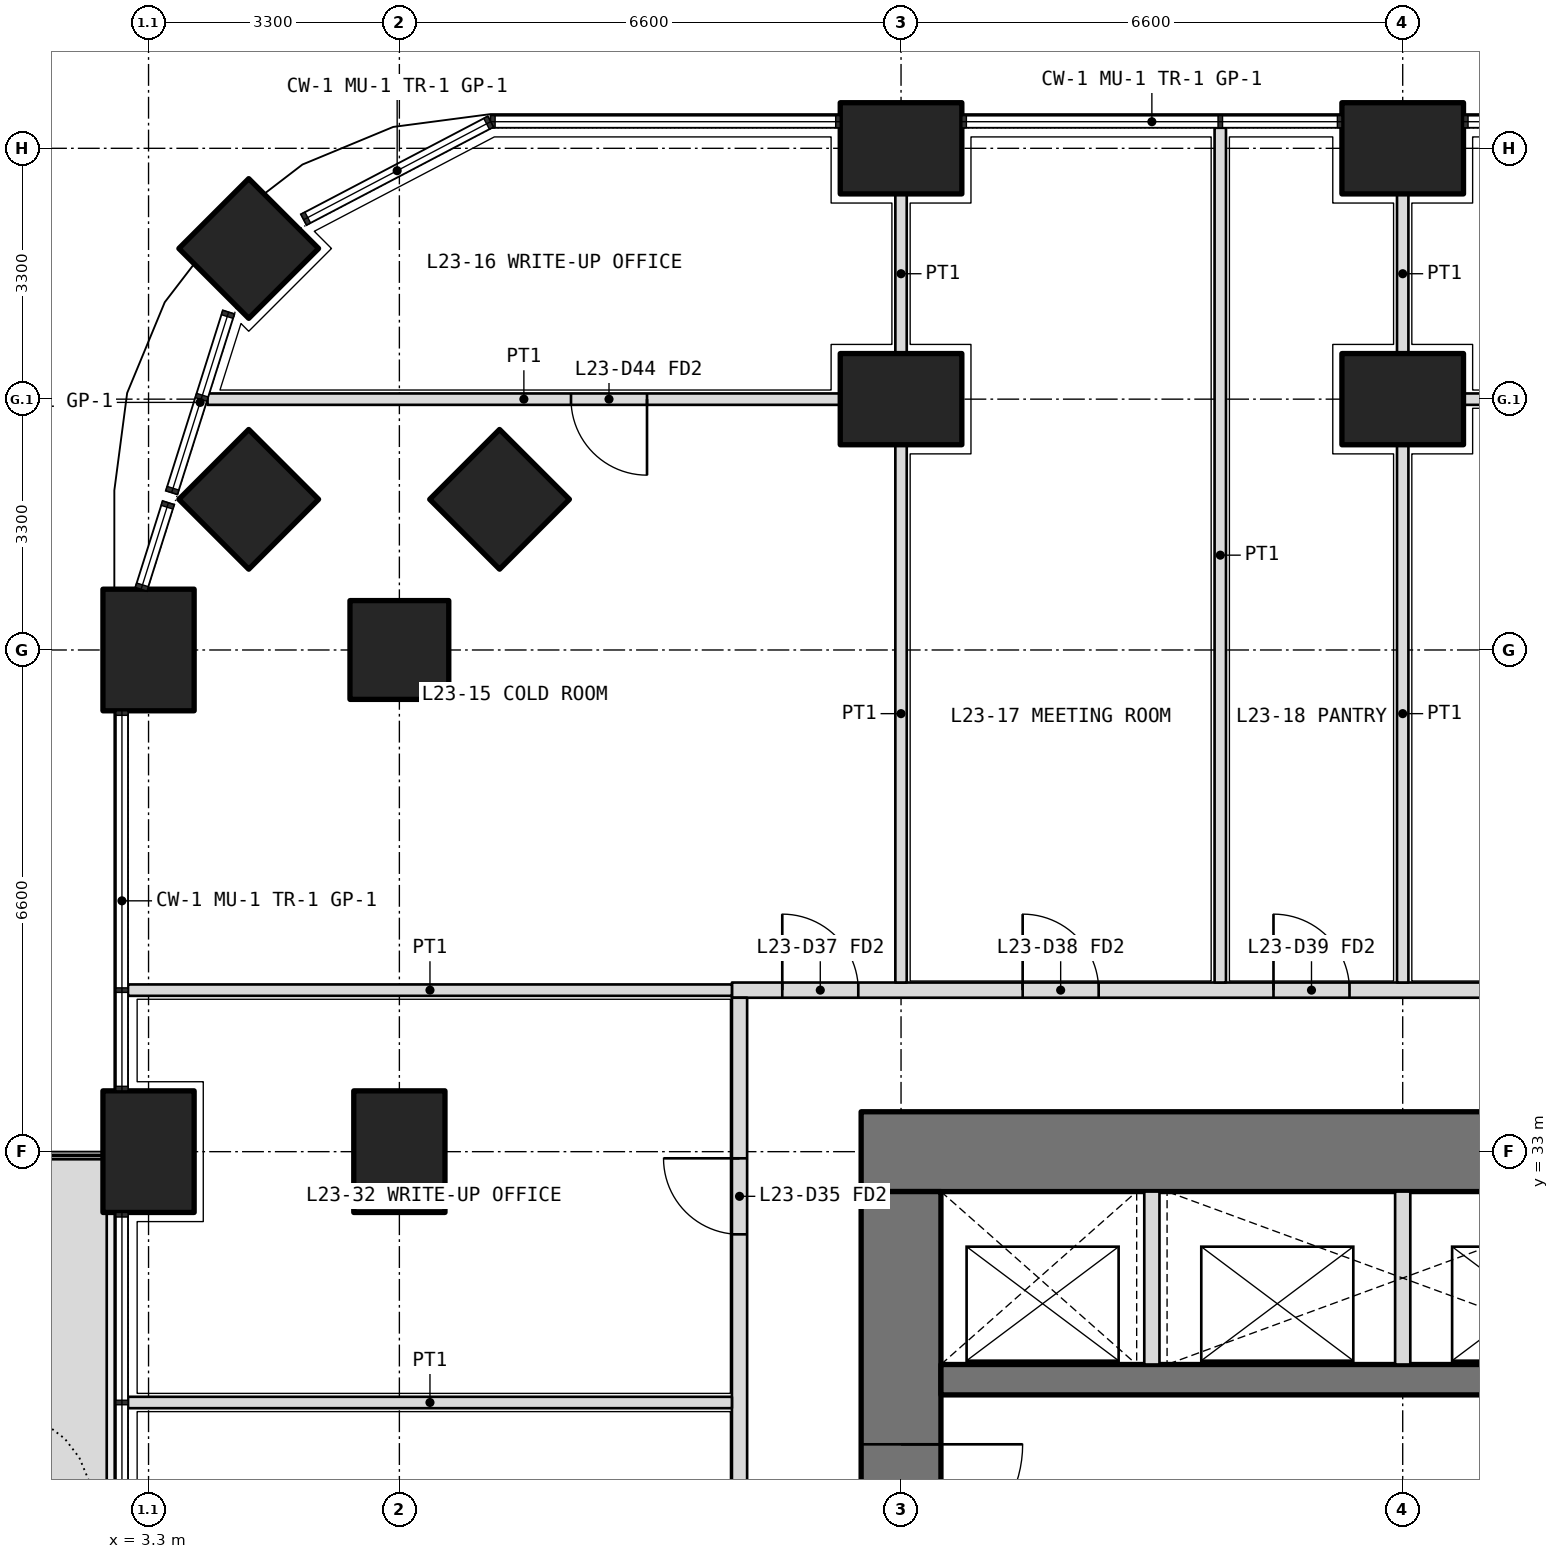
"""IFC4 building model, lengths in metres.
Left out: names, types, materials, properties, quantities, classifications, styles, units other than length and angle.
Written with IfcOpenShell. Run it as: python <this file> out.ifc"""

import sys

from ifc_helpers import new_model, si_unit, direction, frame, frame_2d, origin, origin_2d, place, context, subcontext, project, spatial, polyline, rectangle, outline, extrude, element, fill, save


model = new_model("IFC4")
c1 = context("Model", 3, precision=1e-05, world=origin(), true_north=direction((0.0, 1.0)))
c2 = subcontext(c1, "Body", "Model", "MODEL_VIEW")
j1 = project(units=[si_unit("LENGTHUNIT", "METRE"), si_unit("PLANEANGLEUNIT", "RADIAN")], contexts=[c1])
p1 = place(None, origin())
s1 = spatial("IfcSite", under=j1, at=p1, CompositionType="ELEMENT")
p2 = place(p1, origin())
s2 = spatial("IfcBuilding", under=s1, at=p2, CompositionType="ELEMENT")
p3 = place(p2, frame((0.0, 0.0, 103.2)))
s3 = spatial("IfcBuildingStorey", under=s2, at=p3, CompositionType="ELEMENT", Elevation=103.2)
p4 = place(p3, frame((4.618, 44.882, 0.0), z_axis=(0.0, 0.0, 1.0), x_axis=(0.707106781187, 0.707106781187, 0.0)))
e1 = element("IfcColumn", 1, at=p4, inside=s3, PredefinedType="COLUMN", context=c2, shape_type="SweptSolid", body=[
    extrude(rectangle(XDim=1.3, YDim=1.3, at=origin_2d()), origin(), (0.0, 0.0, 1.0), 4.2),
])
for number, where, z_axis, x_axis in (
    (2, (3.3, 33.0, 0.0), (0.0, 0.0, 1.0), (0.0, 1.0, 0.0)),
    (3, (3.3, 39.6, 0.0), (0.0, 0.0, 1.0), (0.0, 1.0, 0.0)),
    (4, (13.2, 46.2, 0.0), (0.0, 0.0, 1.0), (1.0, 0.0, 0.0)),
    (5, (19.8, 46.2, 0.0), (0.0, 0.0, 1.0), (1.0, 0.0, 0.0)),
):
    element("IfcColumn", number, at=place(p3, frame(where, z_axis=z_axis, x_axis=x_axis)), inside=s3, PredefinedType="COLUMN", context=c2, shape_type="SweptSolid", body=[
        extrude(rectangle(XDim=1.6, YDim=1.2, at=origin_2d()), origin(), (0.0, 0.0, 1.0), 4.2),
    ])
for number, where, z_axis, x_axis in (
    (6, (6.6, 39.6, 0.0), (0.0, 0.0, 1.0), (1.0, 0.0, 0.0)),
    (7, (4.618, 41.582, 0.0), (0.0, 0.0, 1.0), (0.707, 0.707, 0.0)),
):
    element("IfcColumn", number, at=place(p3, frame(where, z_axis=z_axis, x_axis=x_axis)), inside=s3, PredefinedType="COLUMN", context=c2, shape_type="SweptSolid", body=[
        extrude(rectangle(XDim=1.3, YDim=1.3, at=origin_2d()), origin(), (0.0, 0.0, 1.0), 4.2),
    ])
for number, where, z_axis, x_axis in (
    (8, (13.2, 42.9, 0.0), (0.0, 0.0, 1.0), (1.0, 0.0, 0.0)),
    (9, (19.8, 42.9, 0.0), (0.0, 0.0, 1.0), (1.0, 0.0, 0.0)),
):
    element("IfcColumn", number, at=place(p3, frame(where, z_axis=z_axis, x_axis=x_axis)), inside=s3, PredefinedType="COLUMN", context=c2, shape_type="SweptSolid", body=[
        extrude(rectangle(XDim=1.6, YDim=1.2, at=origin_2d()), origin(), (0.0, 0.0, 1.0), 4.2),
    ])
p5 = place(p3, frame((7.918, 41.582, 0.0), z_axis=(0.0, 0.0, 1.0), x_axis=(0.707106781187, 0.707106781187, 0.0)))
e10 = element("IfcColumn", 10, at=p5, inside=s3, PredefinedType="COLUMN", context=c2, shape_type="SweptSolid", body=[
    extrude(rectangle(XDim=1.3, YDim=1.3, at=origin_2d()), origin(), (0.0, 0.0, 1.0), 4.2),
])
p6 = place(p3, frame((6.6, 33.0, 0.0), z_axis=(0.0, 0.0, 1.0), x_axis=(0.0, 1.0, 0.0)))
e11 = element("IfcColumn", 11, at=p6, inside=s3, PredefinedType="COLUMN", context=c2, shape_type="SweptSolid", body=[
    extrude(rectangle(XDim=1.6, YDim=1.2, at=origin_2d()), origin(), (0.0, 0.0, 1.0), 4.2),
])
p7 = place(p3, origin())
e12 = element("IfcWall", 12, at=p7, inside=s3, PredefinedType="USERDEFINED", context=c2, shape_type="SweptSolid", body=[
    extrude(outline(polyline([(1.75, 23.85), (2.75, 23.85), (2.75, 32.9), (1.75, 32.9), (1.75, 23.85)]), holes=[polyline([(1.9, 24.0), (2.6, 24.0), (2.6, 32.75), (1.9, 32.75), (1.9, 24.0)])]), origin(), (0.0, 0.0, 1.0), 1.05),
])
p8 = place(p3, frame((40.125, 33.0, 0.0), z_axis=(0.0, 0.0, 1.0), x_axis=(-1.0, 0.0, 0.0)))
e13 = element("IfcWall", 13, at=p8, inside=s3, PredefinedType="SHEAR", context=c2, shape_type="SweptSolid", body=[
    extrude(rectangle(XDim=27.45, YDim=1.05, at=frame_2d((13.725, 0.0))), origin(), (0.0, 0.0, 1.0), 4.2),
])
p9 = place(p3, frame((13.2, 32.475, 0.0), z_axis=(0.0, 0.0, 1.0), x_axis=(0.0, -1.0, 0.0)))
e14 = element("IfcWall", 14, at=p9, inside=s3, PredefinedType="SHEAR", context=c2, shape_type="SweptSolid", body=[
    extrude(rectangle(XDim=18.75, YDim=1.05, at=frame_2d((9.375, 0.0))), origin(), (0.0, 0.0, 1.0), 4.2),
])
p10 = place(p9, frame((14.125, 0.0, 0.0)))
e15 = element("IfcOpeningElement", 15, at=p10, cuts=e14, PredefinedType="OPENING", context=c2, shape_type="SweptSolid", body=[
    extrude(rectangle(XDim=1.6, YDim=2.1, at=frame_2d((0.8, 1.05))), frame((0.0, 0.535, 0.0), z_axis=(0.0, -1.0, 0.0), x_axis=(1.0, 0.0, 0.0)), (0.0, 0.0, 1.0), 1.07),
])
p11 = place(p9, frame((3.325, 0.0, 0.0)))
e16 = element("IfcOpeningElement", 16, at=p11, cuts=e14, PredefinedType="OPENING", context=c2, shape_type="SweptSolid", body=[
    extrude(rectangle(XDim=1.6, YDim=2.1, at=frame_2d((0.8, 1.05))), frame((0.0, 0.535, 0.0), z_axis=(0.0, -1.0, 0.0), x_axis=(1.0, 0.0, 0.0)), (0.0, 0.0, 1.0), 1.07),
])
p12 = place(p3, frame((13.725, 30.0, 0.0), z_axis=(0.0, 0.0, 1.0), x_axis=(1.0, 0.0, 0.0)))
e17 = element("IfcWall", 17, at=p12, inside=s3, PredefinedType="SHEAR", context=c2, shape_type="SweptSolid", body=[
    extrude(rectangle(XDim=25.35, YDim=0.4, at=frame_2d((12.675, 0.0))), origin(), (0.0, 0.0, 1.0), 4.2),
])
for number, where, z_axis, x_axis in (
    (18, (16.5, 30.2, 0.0), (0.0, 0.0, 1.0), (0.0, 1.0, 0.0)),
    (19, (19.8, 30.2, 0.0), (0.0, 0.0, 1.0), (0.0, 1.0, 0.0)),
):
    element("IfcWall", number, at=place(p3, frame(where, z_axis=z_axis, x_axis=x_axis)), inside=s3, PredefinedType="PARTITIONING", context=c2, shape_type="SweptSolid", body=[
        extrude(rectangle(XDim=2.275, YDim=0.2, at=frame_2d((1.138, 0.0))), origin(), (0.0, 0.0, 1.0), 4.2),
    ])
p13 = place(p3, frame((10.975, 35.125, 0.0), z_axis=(0.0, 0.0, 1.0), x_axis=(1.0, 0.0, 0.0)))
e20 = element("IfcWall", 20, at=p13, inside=s3, PredefinedType="PARTITIONING", context=c2, shape_type="SweptSolid", body=[
    extrude(rectangle(XDim=25.325, YDim=0.2, at=frame_2d((12.663, 0.0))), origin(), (0.0, 0.0, 1.0), 2.85),
])
p14 = place(p13, frame((0.663, 0.0, 0.0)))
e21 = element("IfcOpeningElement", 21, at=p14, cuts=e20, PredefinedType="OPENING", context=c2, shape_type="SweptSolid", body=[
    extrude(rectangle(XDim=1.0, YDim=2.1, at=frame_2d((0.5, 1.05))), frame((0.0, 0.11, 0.0), z_axis=(0.0, -1.0, 0.0), x_axis=(1.0, 0.0, 0.0)), (0.0, 0.0, 1.0), 0.22),
])
p15 = place(p13, frame((3.825, 0.0, 0.0)))
e22 = element("IfcOpeningElement", 22, at=p15, cuts=e20, PredefinedType="OPENING", context=c2, shape_type="SweptSolid", body=[
    extrude(rectangle(XDim=1.0, YDim=2.1, at=frame_2d((0.5, 1.05))), frame((0.0, 0.11, 0.0), z_axis=(0.0, -1.0, 0.0), x_axis=(1.0, 0.0, 0.0)), (0.0, 0.0, 1.0), 0.22),
])
p16 = place(p13, frame((7.125, 0.0, 0.0)))
e23 = element("IfcOpeningElement", 23, at=p16, cuts=e20, PredefinedType="OPENING", context=c2, shape_type="SweptSolid", body=[
    extrude(rectangle(XDim=1.0, YDim=2.1, at=frame_2d((0.5, 1.05))), frame((0.0, 0.11, 0.0), z_axis=(0.0, -1.0, 0.0), x_axis=(1.0, 0.0, 0.0)), (0.0, 0.0, 1.0), 0.22),
])
p17 = place(p13, frame((11.525, 0.0, 0.0)))
e24 = element("IfcOpeningElement", 24, at=p17, cuts=e20, PredefinedType="OPENING", context=c2, shape_type="SweptSolid", body=[
    extrude(rectangle(XDim=1.2, YDim=2.1, at=frame_2d((0.6, 1.05))), frame((0.0, 0.11, 0.0), z_axis=(0.0, -1.0, 0.0), x_axis=(1.0, 0.0, 0.0)), (0.0, 0.0, 1.0), 0.22),
])
p18 = place(p13, frame((19.775, 0.0, 0.0)))
e25 = element("IfcOpeningElement", 25, at=p18, cuts=e20, PredefinedType="OPENING", context=c2, shape_type="SweptSolid", body=[
    extrude(rectangle(XDim=1.2, YDim=2.1, at=frame_2d((0.6, 1.05))), frame((0.0, 0.11, 0.0), z_axis=(0.0, -1.0, 0.0), x_axis=(1.0, 0.0, 0.0)), (0.0, 0.0, 1.0), 0.22),
])
p19 = place(p3, frame((11.075, 7.4, 0.0), z_axis=(0.0, 0.0, 1.0), x_axis=(0.0, 1.0, 0.0)))
e26 = element("IfcWall", 26, at=p19, inside=s3, PredefinedType="PARTITIONING", context=c2, shape_type="SweptSolid", body=[
    extrude(rectangle(XDim=27.625, YDim=0.2, at=frame_2d((13.812, 0.0))), origin(), (0.0, 0.0, 1.0), 2.85),
])
p20 = place(p19, frame((2.35, 0.0, 0.0)))
e27 = element("IfcOpeningElement", 27, at=p20, cuts=e26, PredefinedType="OPENING", context=c2, shape_type="SweptSolid", body=[
    extrude(rectangle(XDim=1.0, YDim=2.1, at=frame_2d((0.5, 1.05))), frame((0.0, 0.11, 0.0), z_axis=(0.0, -1.0, 0.0), x_axis=(1.0, 0.0, 0.0)), (0.0, 0.0, 1.0), 0.22),
])
p21 = place(p19, frame((6.35, 0.0, 0.0)))
e28 = element("IfcOpeningElement", 28, at=p21, cuts=e26, PredefinedType="OPENING", context=c2, shape_type="SweptSolid", body=[
    extrude(rectangle(XDim=1.0, YDim=2.1, at=frame_2d((0.5, 1.05))), frame((0.0, 0.11, 0.0), z_axis=(0.0, -1.0, 0.0), x_axis=(1.0, 0.0, 0.0)), (0.0, 0.0, 1.0), 0.22),
])
p22 = place(p19, frame((9.425, 0.0, 0.0)))
e29 = element("IfcOpeningElement", 29, at=p22, cuts=e26, PredefinedType="OPENING", context=c2, shape_type="SweptSolid", body=[
    extrude(rectangle(XDim=0.9, YDim=2.1, at=frame_2d((0.45, 1.05))), frame((0.0, 0.11, 0.0), z_axis=(0.0, -1.0, 0.0), x_axis=(1.0, 0.0, 0.0)), (0.0, 0.0, 1.0), 0.22),
])
p23 = place(p19, frame((13.275, 0.0, 0.0)))
e30 = element("IfcOpeningElement", 30, at=p23, cuts=e26, PredefinedType="OPENING", context=c2, shape_type="SweptSolid", body=[
    extrude(rectangle(XDim=0.9, YDim=2.1, at=frame_2d((0.45, 1.05))), frame((0.0, 0.11, 0.0), z_axis=(0.0, -1.0, 0.0), x_axis=(1.0, 0.0, 0.0)), (0.0, 0.0, 1.0), 0.22),
])
p24 = place(p19, frame((16.8, 0.0, 0.0)))
e31 = element("IfcOpeningElement", 31, at=p24, cuts=e26, PredefinedType="OPENING", context=c2, shape_type="SweptSolid", body=[
    extrude(rectangle(XDim=1.0, YDim=2.1, at=frame_2d((0.5, 1.05))), frame((0.0, 0.11, 0.0), z_axis=(0.0, -1.0, 0.0), x_axis=(1.0, 0.0, 0.0)), (0.0, 0.0, 1.0), 0.22),
])
p25 = place(p19, frame((20.15, 0.0, 0.0)))
e32 = element("IfcOpeningElement", 32, at=p25, cuts=e26, PredefinedType="OPENING", context=c2, shape_type="SweptSolid", body=[
    extrude(rectangle(XDim=1.0, YDim=2.1, at=frame_2d((0.5, 1.05))), frame((0.0, 0.11, 0.0), z_axis=(0.0, -1.0, 0.0), x_axis=(1.0, 0.0, 0.0)), (0.0, 0.0, 1.0), 0.22),
])
p26 = place(p19, frame((24.512, 0.0, 0.0)))
e33 = element("IfcOpeningElement", 33, at=p26, cuts=e26, PredefinedType="OPENING", context=c2, shape_type="SweptSolid", body=[
    extrude(rectangle(XDim=1.0, YDim=2.1, at=frame_2d((0.5, 1.05))), frame((0.0, 0.11, 0.0), z_axis=(0.0, -1.0, 0.0), x_axis=(1.0, 0.0, 0.0)), (0.0, 0.0, 1.0), 0.22),
])
p27 = place(p3, frame((3.03, 35.125, 0.0), z_axis=(0.0, 0.0, 1.0), x_axis=(1.0, 0.0, 0.0)))
e34 = element("IfcWall", 34, at=p27, inside=s3, PredefinedType="PARTITIONING", context=c2, shape_type="SweptSolid", body=[
    extrude(rectangle(XDim=7.945, YDim=0.15, at=frame_2d((3.973, 0.0))), origin(), (0.0, 0.0, 1.0), 2.7),
])
p28 = place(p3, frame((25.6, 42.9, 0.0), z_axis=(0.0, 0.0, 1.0), x_axis=(-1.0, 0.0, 0.0)))
e35 = element("IfcWall", 35, at=p28, inside=s3, PredefinedType="PARTITIONING", context=c2, shape_type="SweptSolid", body=[
    extrude(rectangle(XDim=5.0, YDim=0.15, at=frame_2d((2.5, 0.0))), origin(), (0.0, 0.0, 1.0), 3.9),
])
p29 = place(p28, frame((2.0, 0.0, 0.0)))
e36 = element("IfcOpeningElement", 36, at=p29, cuts=e35, PredefinedType="OPENING", context=c2, shape_type="SweptSolid", body=[
    extrude(rectangle(XDim=1.0, YDim=2.1, at=frame_2d((0.5, 1.05))), frame((0.0, 0.085, 0.0), z_axis=(0.0, -1.0, 0.0), x_axis=(1.0, 0.0, 0.0)), (0.0, 0.0, 1.0), 0.17),
])
p30 = place(p3, frame((12.4, 42.9, 0.0), z_axis=(0.0, 0.0, 1.0), x_axis=(-1.0, 0.0, 0.0)))
e37 = element("IfcWall", 37, at=p30, inside=s3, PredefinedType="PARTITIONING", context=c2, shape_type="SweptSolid", body=[
    extrude(rectangle(XDim=8.324, YDim=0.15, at=frame_2d((4.162, 0.0))), origin(), (0.0, 0.0, 1.0), 2.7),
])
p31 = place(p30, frame((2.542, 0.0, 0.0)))
e38 = element("IfcOpeningElement", 38, at=p31, cuts=e37, PredefinedType="OPENING", context=c2, shape_type="SweptSolid", body=[
    extrude(rectangle(XDim=1.0, YDim=2.1, at=frame_2d((0.5, 1.05))), frame((0.0, 0.085, 0.0), z_axis=(0.0, -1.0, 0.0), x_axis=(1.0, 0.0, 0.0)), (0.0, 0.0, 1.0), 0.17),
])
p32 = place(p3, frame((17.4, 46.47, 0.0), z_axis=(0.0, 0.0, 1.0), x_axis=(0.0, -1.0, 0.0)))
e39 = element("IfcWall", 39, at=p32, inside=s3, PredefinedType="PARTITIONING", context=c2, shape_type="SweptSolid", body=[
    extrude(rectangle(XDim=11.245, YDim=0.15, at=frame_2d((5.623, 0.0))), origin(), (0.0, 0.0, 1.0), 2.7),
])
p33 = place(p3, frame((19.8, 45.6, 0.0), z_axis=(0.0, 0.0, 1.0), x_axis=(0.0, -1.0, 0.0)))
e40 = element("IfcWall", 40, at=p33, inside=s3, PredefinedType="PARTITIONING", context=c2, shape_type="SweptSolid", body=[
    extrude(rectangle(XDim=2.1, YDim=0.15, at=frame_2d((1.05, 0.0))), origin(), (0.0, 0.0, 1.0), 2.85),
])
p34 = place(p3, frame((19.8, 42.3, 0.0), z_axis=(0.0, 0.0, 1.0), x_axis=(0.0, -1.0, 0.0)))
e41 = element("IfcWall", 41, at=p34, inside=s3, PredefinedType="PARTITIONING", context=c2, shape_type="SweptSolid", body=[
    extrude(rectangle(XDim=7.075, YDim=0.15, at=frame_2d((3.538, 0.0))), origin(), (0.0, 0.0, 1.0), 2.85),
])
p35 = place(p3, frame((13.2, 45.6, 0.0), z_axis=(0.0, 0.0, 1.0), x_axis=(0.0, -1.0, 0.0)))
e42 = element("IfcWall", 42, at=p35, inside=s3, PredefinedType="PARTITIONING", context=c2, shape_type="SweptSolid", body=[
    extrude(rectangle(XDim=2.1, YDim=0.15, at=frame_2d((1.05, 0.0))), origin(), (0.0, 0.0, 1.0), 2.85),
])
p36 = place(p3, frame((13.2, 42.3, 0.0), z_axis=(0.0, 0.0, 1.0), x_axis=(0.0, -1.0, 0.0)))
e43 = element("IfcWall", 43, at=p36, inside=s3, PredefinedType="PARTITIONING", context=c2, shape_type="SweptSolid", body=[
    extrude(rectangle(XDim=7.075, YDim=0.15, at=frame_2d((3.538, 0.0))), origin(), (0.0, 0.0, 1.0), 2.85),
])
p37 = place(p3, frame((3.03, 29.7, 0.0), z_axis=(0.0, 0.0, 1.0), x_axis=(1.0, 0.0, 0.0)))
e44 = element("IfcWall", 44, at=p37, inside=s3, PredefinedType="PARTITIONING", context=c2, shape_type="SweptSolid", body=[
    extrude(rectangle(XDim=7.945, YDim=0.15, at=frame_2d((3.973, 0.0))), origin(), (0.0, 0.0, 1.0), 2.7),
])
p38 = place(p14, origin())
e45 = element("IfcDoor", 45, at=p38, inside=s3, OperationType="SINGLE_SWING_LEFT", PredefinedType="DOOR", context=c2, shape_type="SweptSolid", body=[
    extrude(rectangle(XDim=1.0, YDim=2.1, at=frame_2d((0.5, 1.05))), frame((0.0, 0.025, 0.0), z_axis=(0.0, -1.0, 0.0), x_axis=(1.0, 0.0, 0.0)), (0.0, 0.0, 1.0), 0.05),
])
fill(e21, e45)
p39 = place(p31, origin())
e46 = element("IfcDoor", 46, at=p39, inside=s3, OperationType="SINGLE_SWING_LEFT", PredefinedType="DOOR", context=c2, shape_type="SweptSolid", body=[
    extrude(rectangle(XDim=1.0, YDim=2.1, at=frame_2d((0.5, 1.05))), frame((0.0, 0.025, 0.0), z_axis=(0.0, -1.0, 0.0), x_axis=(1.0, 0.0, 0.0)), (0.0, 0.0, 1.0), 0.05),
])
fill(e38, e46)
p40 = place(p15, origin())
e47 = element("IfcDoor", 47, at=p40, inside=s3, OperationType="SINGLE_SWING_LEFT", PredefinedType="DOOR", context=c2, shape_type="SweptSolid", body=[
    extrude(rectangle(XDim=1.0, YDim=2.1, at=frame_2d((0.5, 1.05))), frame((0.0, 0.025, 0.0), z_axis=(0.0, -1.0, 0.0), x_axis=(1.0, 0.0, 0.0)), (0.0, 0.0, 1.0), 0.05),
])
fill(e22, e47)
p41 = place(p16, origin())
e48 = element("IfcDoor", 48, at=p41, inside=s3, OperationType="SINGLE_SWING_LEFT", PredefinedType="DOOR", context=c2, shape_type="SweptSolid", body=[
    extrude(rectangle(XDim=1.0, YDim=2.1, at=frame_2d((0.5, 1.05))), frame((0.0, 0.025, 0.0), z_axis=(0.0, -1.0, 0.0), x_axis=(1.0, 0.0, 0.0)), (0.0, 0.0, 1.0), 0.05),
])
fill(e23, e48)
p42 = place(p26, origin())
e49 = element("IfcDoor", 49, at=p42, inside=s3, OperationType="SINGLE_SWING_RIGHT", PredefinedType="DOOR", context=c2, shape_type="SweptSolid", body=[
    extrude(rectangle(XDim=1.0, YDim=2.1, at=frame_2d((0.5, 1.05))), frame((0.0, 0.025, 0.0), z_axis=(0.0, -1.0, 0.0), x_axis=(1.0, 0.0, 0.0)), (0.0, 0.0, 1.0), 0.05),
])
fill(e33, e49)
p43 = place(p11, origin())
e50 = element("IfcDoor", 50, at=p43, inside=s3, OperationType="DOUBLE_DOOR_DOUBLE_SWING", PredefinedType="DOOR", context=c2, shape_type="SweptSolid", body=[
    extrude(rectangle(XDim=1.6, YDim=2.1, at=frame_2d((0.8, 1.05))), frame((0.0, 0.025, 0.0), z_axis=(0.0, -1.0, 0.0), x_axis=(1.0, 0.0, 0.0)), (0.0, 0.0, 1.0), 0.05),
])
fill(e16, e50)
save(model, sys.argv[1])
